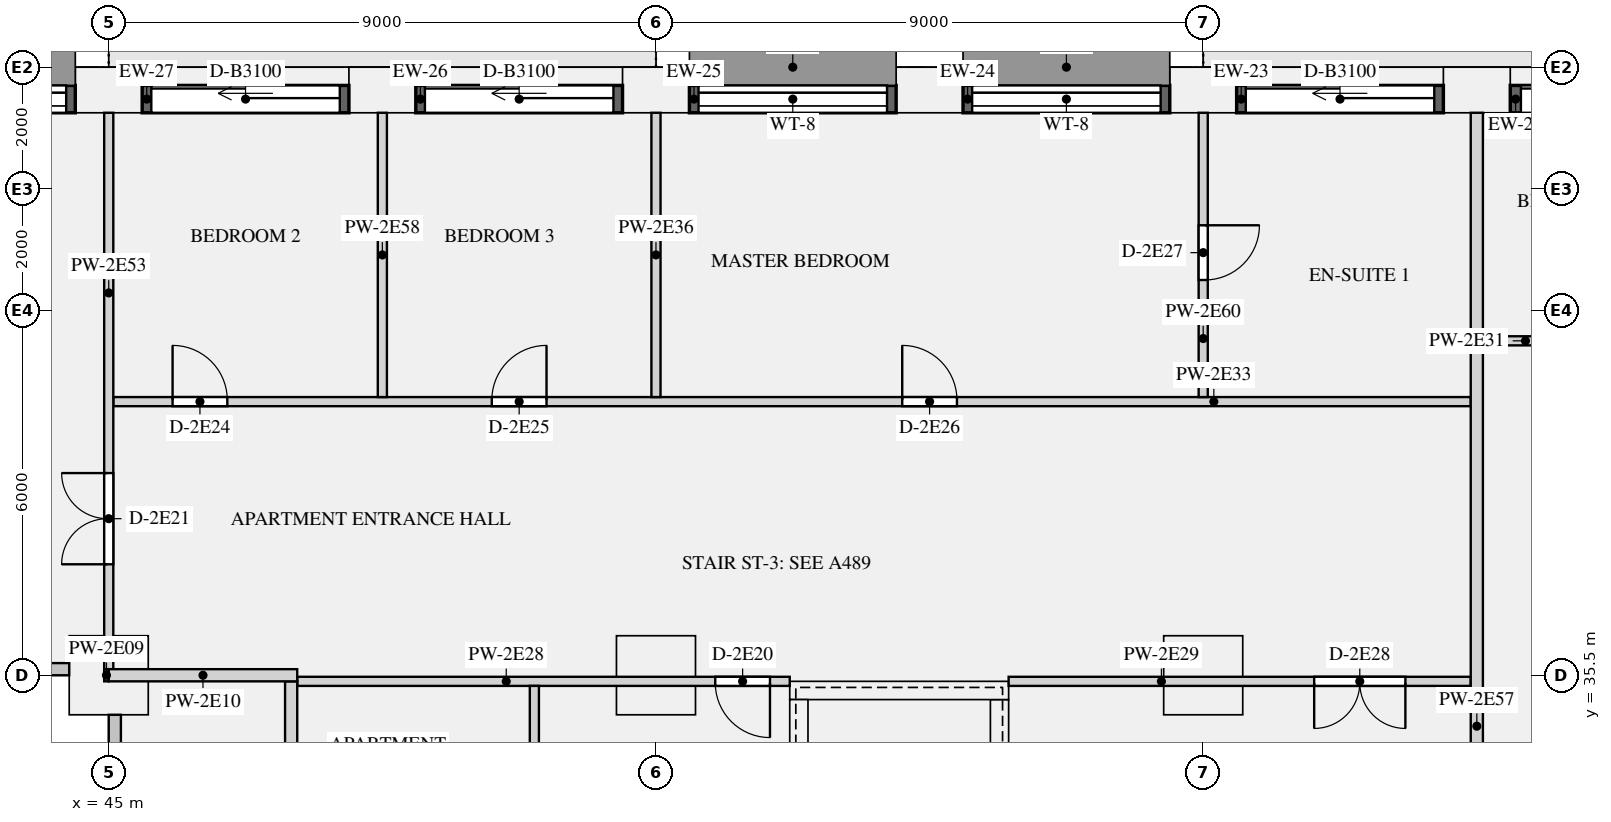
"""IFC4 building model, lengths in metres.
Left out: names, types, materials, properties, quantities, classifications, styles, units other than length and angle.
Written with IfcOpenShell. Run it as: python <this file> out.ifc"""

import sys

from ifc_helpers import new_model, si_unit, direction, frame, frame_2d, origin, origin_2d, place, context, subcontext, project, spatial, rectangle, extrude, element, fill, save


model = new_model("IFC4")
c1 = context("Model", 3, precision=1e-05, world=origin(), true_north=direction((0.0, 1.0)))
c2 = subcontext(c1, "Body", "Model", "MODEL_VIEW")
j1 = project(units=[si_unit("LENGTHUNIT", "METRE"), si_unit("PLANEANGLEUNIT", "RADIAN")], contexts=[c1])
p1 = place(None, origin())
s1 = spatial("IfcSite", under=j1, at=p1, CompositionType="ELEMENT")
p2 = place(p1, origin())
s2 = spatial("IfcBuilding", under=s1, at=p2, CompositionType="ELEMENT")
p3 = place(p2, frame((0.0, 0.0, 118.2)))
s3 = spatial("IfcBuildingStorey", under=s2, at=p3, CompositionType="ELEMENT", Elevation=118.2)
for number, where, z_axis, x_axis in (
    (1, (67.5, 45.125, 0.0), (0.0, 0.0, 1.0), (-1.0, 0.0, 0.0)),
    (2, (63.0, 45.125, 0.0), (0.0, 0.0, 1.0), (-1.0, 0.0, 0.0)),
    (3, (58.5, 45.125, 0.0), (0.0, 0.0, 1.0), (-1.0, 0.0, 0.0)),
    (4, (54.0, 45.125, 0.0), (0.0, 0.0, 1.0), (-1.0, 0.0, 0.0)),
    (5, (49.5, 45.125, 0.0), (0.0, 0.0, 1.0), (-1.0, 0.0, 0.0)),
    (6, (45.0, 45.125, 0.0), (0.0, 0.0, 1.0), (-1.0, 0.0, 0.0)),
):
    element("IfcColumn", number, at=place(p3, frame(where, z_axis=z_axis, x_axis=x_axis)), inside=s3, PredefinedType="USERDEFINED", context=c2, shape_type="SweptSolid", body=[
        extrude(rectangle(XDim=1.1, YDim=0.75, at=origin_2d()), origin(), (0.0, 0.0, 1.0), 3.15),
    ])
for number, where, z_axis, x_axis in (
    (7, (45.0, 35.5, 0.0), (0.0, 0.0, 1.0), (1.0, 0.0, 0.0)),
    (8, (54.0, 35.5, 0.0), (0.0, 0.0, 1.0), (1.0, 0.0, 0.0)),
    (9, (63.0, 35.5, 0.0), (0.0, 0.0, 1.0), (1.0, 0.0, 0.0)),
):
    element("IfcColumn", number, at=place(p3, frame(where, z_axis=z_axis, x_axis=x_axis)), inside=s3, PredefinedType="COLUMN", context=c2, shape_type="SweptSolid", body=[
        extrude(rectangle(XDim=1.3, YDim=1.3, at=origin_2d()), origin(), (0.0, 0.0, 1.0), 3.15),
    ])
p4 = place(p3, frame((56.2, 35.25, 0.0), z_axis=(0.0, 0.0, 1.0), x_axis=(1.0, 0.0, 0.0)))
e10 = element("IfcWall", 10, at=p4, inside=s3, PredefinedType="SHEAR", context=c2, shape_type="SweptSolid", body=[
    extrude(rectangle(XDim=3.6, YDim=0.3, at=frame_2d((1.8, 0.0))), origin(), (0.0, 0.0, 1.0), 3.15),
])
for number, where, z_axis, x_axis in (
    (11, (56.35, 27.3, 0.0), (0.0, 0.0, 1.0), (0.0, 1.0, 0.0)),
    (12, (59.65, 27.3, 0.0), (0.0, 0.0, 1.0), (0.0, 1.0, 0.0)),
):
    element("IfcWall", number, at=place(p3, frame(where, z_axis=z_axis, x_axis=x_axis)), inside=s3, PredefinedType="SHEAR", context=c2, shape_type="SweptSolid", body=[
        extrude(rectangle(XDim=7.8, YDim=0.3, at=frame_2d((3.9, 0.0))), origin(), (0.0, 0.0, 1.0), 3.15),
    ])
p5 = place(p3, frame((70.9, 44.975, 0.0), z_axis=(0.0, 0.0, 1.0), x_axis=(-1.0, 0.0, 0.0)))
e13 = element("IfcWall", 13, at=p5, inside=s3, PredefinedType="SOLIDWALL", context=c2, shape_type="SweptSolid", body=[
    extrude(rectangle(XDim=2.85, YDim=0.45, at=frame_2d((1.425, 0.0))), origin(), (0.0, 0.0, 1.0), 2.83),
])
p6 = place(p5, frame((0.175, 0.0, 0.0)))
e14 = element("IfcOpeningElement", 14, at=p6, cuts=e13, PredefinedType="OPENING", context=c2, shape_type="SweptSolid", body=[
    extrude(rectangle(XDim=2.5, YDim=2.3, at=frame_2d((1.25, 1.15))), frame((0.0, 0.235, 0.0), z_axis=(0.0, -1.0, 0.0), x_axis=(1.0, 0.0, 0.0)), (0.0, 0.0, 1.0), 0.47),
])
p7 = place(p3, frame((66.95, 44.975, 0.0), z_axis=(0.0, 0.0, 1.0), x_axis=(-1.0, 0.0, 0.0)))
e15 = element("IfcWall", 15, at=p7, inside=s3, PredefinedType="SOLIDWALL", context=c2, shape_type="SweptSolid", body=[
    extrude(rectangle(XDim=3.4, YDim=0.45, at=frame_2d((1.7, 0.0))), origin(), (0.0, 0.0, 1.0), 2.83),
])
p8 = place(p7, frame((0.15, 0.0, 0.0)))
e16 = element("IfcOpeningElement", 16, at=p8, cuts=e15, PredefinedType="OPENING", context=c2, shape_type="SweptSolid", body=[
    extrude(rectangle(XDim=3.1, YDim=2.3, at=frame_2d((1.55, 1.15))), frame((0.0, 0.235, 0.0), z_axis=(0.0, -1.0, 0.0), x_axis=(1.0, 0.0, 0.0)), (0.0, 0.0, 1.0), 0.47),
])
p9 = place(p3, frame((62.45, 44.975, 0.9), z_axis=(0.0, 0.0, 1.0), x_axis=(-1.0, 0.0, 0.0)))
e17 = element("IfcWall", 17, at=p9, inside=s3, PredefinedType="SOLIDWALL", context=c2, shape_type="SweptSolid", body=[
    extrude(rectangle(XDim=3.4, YDim=0.45, at=frame_2d((1.7, 0.0))), origin(), (0.0, 0.0, 1.0), 1.93),
])
p10 = place(p9, frame((0.15, 0.0, 0.15)))
e18 = element("IfcOpeningElement", 18, at=p10, cuts=e17, PredefinedType="OPENING", context=c2, shape_type="SweptSolid", body=[
    extrude(rectangle(XDim=3.1, YDim=1.5, at=frame_2d((1.55, 0.75))), frame((0.0, 0.235, 0.0), z_axis=(0.0, -1.0, 0.0), x_axis=(1.0, 0.0, 0.0)), (0.0, 0.0, 1.0), 0.47),
])
p11 = place(p3, frame((57.95, 44.975, 0.9), z_axis=(0.0, 0.0, 1.0), x_axis=(-1.0, 0.0, 0.0)))
e19 = element("IfcWall", 19, at=p11, inside=s3, PredefinedType="SOLIDWALL", context=c2, shape_type="SweptSolid", body=[
    extrude(rectangle(XDim=3.4, YDim=0.45, at=frame_2d((1.7, 0.0))), origin(), (0.0, 0.0, 1.0), 1.93),
])
p12 = place(p11, frame((0.15, 0.0, 0.15)))
e20 = element("IfcOpeningElement", 20, at=p12, cuts=e19, PredefinedType="OPENING", context=c2, shape_type="SweptSolid", body=[
    extrude(rectangle(XDim=3.1, YDim=1.5, at=frame_2d((1.55, 0.75))), frame((0.0, 0.235, 0.0), z_axis=(0.0, -1.0, 0.0), x_axis=(1.0, 0.0, 0.0)), (0.0, 0.0, 1.0), 0.47),
])
p13 = place(p3, frame((53.45, 44.975, 0.0), z_axis=(0.0, 0.0, 1.0), x_axis=(-1.0, 0.0, 0.0)))
e21 = element("IfcWall", 21, at=p13, inside=s3, PredefinedType="SOLIDWALL", context=c2, shape_type="SweptSolid", body=[
    extrude(rectangle(XDim=3.4, YDim=0.45, at=frame_2d((1.7, 0.0))), origin(), (0.0, 0.0, 1.0), 2.83),
])
p14 = place(p13, frame((0.15, 0.0, 0.0)))
e22 = element("IfcOpeningElement", 22, at=p14, cuts=e21, PredefinedType="OPENING", context=c2, shape_type="SweptSolid", body=[
    extrude(rectangle(XDim=3.1, YDim=2.3, at=frame_2d((1.55, 1.15))), frame((0.0, 0.235, 0.0), z_axis=(0.0, -1.0, 0.0), x_axis=(1.0, 0.0, 0.0)), (0.0, 0.0, 1.0), 0.47),
])
p15 = place(p3, frame((48.95, 44.975, 0.0), z_axis=(0.0, 0.0, 1.0), x_axis=(-1.0, 0.0, 0.0)))
e23 = element("IfcWall", 23, at=p15, inside=s3, PredefinedType="SOLIDWALL", context=c2, shape_type="SweptSolid", body=[
    extrude(rectangle(XDim=3.4, YDim=0.45, at=frame_2d((1.7, 0.0))), origin(), (0.0, 0.0, 1.0), 2.83),
])
p16 = place(p15, frame((0.15, 0.0, 0.0)))
e24 = element("IfcOpeningElement", 24, at=p16, cuts=e23, PredefinedType="OPENING", context=c2, shape_type="SweptSolid", body=[
    extrude(rectangle(XDim=3.1, YDim=2.3, at=frame_2d((1.55, 1.15))), frame((0.0, 0.235, 0.0), z_axis=(0.0, -1.0, 0.0), x_axis=(1.0, 0.0, 0.0)), (0.0, 0.0, 1.0), 0.47),
])
p17 = place(p3, frame((44.45, 44.975, 0.9), z_axis=(0.0, 0.0, 1.0), x_axis=(-1.0, 0.0, 0.0)))
e25 = element("IfcWall", 25, at=p17, inside=s3, PredefinedType="SOLIDWALL", context=c2, shape_type="SweptSolid", body=[
    extrude(rectangle(XDim=3.4, YDim=0.45, at=frame_2d((1.7, 0.0))), origin(), (0.0, 0.0, 1.0), 1.93),
])
p18 = place(p17, frame((0.15, 0.0, 0.15)))
e26 = element("IfcOpeningElement", 26, at=p18, cuts=e25, PredefinedType="OPENING", context=c2, shape_type="SweptSolid", body=[
    extrude(rectangle(XDim=3.1, YDim=1.5, at=frame_2d((1.55, 0.75))), frame((0.0, 0.235, 0.0), z_axis=(0.0, -1.0, 0.0), x_axis=(1.0, 0.0, 0.0)), (0.0, 0.0, 1.0), 0.47),
])
p19 = place(p3, frame((44.925, 35.5, 0.0), z_axis=(0.0, 0.0, 1.0), x_axis=(1.0, 0.0, 0.0)))
e27 = element("IfcWall", 27, at=p19, inside=s3, PredefinedType="PARTITIONING", context=c2, shape_type="SweptSolid", body=[
    extrude(rectangle(XDim=0.075, YDim=0.2, at=frame_2d((0.038, 0.0))), origin(), (0.0, 0.0, 1.0), 2.83),
])
p20 = place(p3, frame((45.0, 35.5, 0.0), z_axis=(0.0, 0.0, 1.0), x_axis=(1.0, 0.0, 0.0)))
e28 = element("IfcWall", 28, at=p20, inside=s3, PredefinedType="PARTITIONING", context=c2, shape_type="SweptSolid", body=[
    extrude(rectangle(XDim=3.1, YDim=0.2, at=frame_2d((1.55, 0.0))), origin(), (0.0, 0.0, 1.0), 2.83),
])
p21 = place(p3, frame((48.1, 35.4, 0.0), z_axis=(0.0, 0.0, 1.0), x_axis=(1.0, 0.0, 0.0)))
e29 = element("IfcWall", 29, at=p21, inside=s3, PredefinedType="PARTITIONING", context=c2, shape_type="SweptSolid", body=[
    extrude(rectangle(XDim=8.1, YDim=0.15, at=frame_2d((4.05, 0.0))), origin(), (0.0, 0.0, 1.0), 2.83),
])
p22 = place(p21, frame((6.875, 0.0, 0.0)))
e30 = element("IfcOpeningElement", 30, at=p22, cuts=e29, PredefinedType="OPENING", context=c2, shape_type="SweptSolid", body=[
    extrude(rectangle(XDim=0.9, YDim=2.1, at=frame_2d((0.45, 1.05))), frame((0.0, 0.085, 0.0), z_axis=(0.0, -1.0, 0.0), x_axis=(1.0, 0.0, 0.0)), (0.0, 0.0, 1.0), 0.17),
])
p23 = place(p3, frame((59.8, 35.4, 0.0), z_axis=(0.0, 0.0, 1.0), x_axis=(1.0, 0.0, 0.0)))
e31 = element("IfcWall", 31, at=p23, inside=s3, PredefinedType="PARTITIONING", context=c2, shape_type="SweptSolid", body=[
    extrude(rectangle(XDim=7.6, YDim=0.15, at=frame_2d((3.8, 0.0))), origin(), (0.0, 0.0, 1.0), 2.83),
])
p24 = place(p23, frame((5.025, 0.0, 0.0)))
e32 = element("IfcOpeningElement", 32, at=p24, cuts=e31, PredefinedType="OPENING", context=c2, shape_type="SweptSolid", body=[
    extrude(rectangle(XDim=1.5, YDim=2.1, at=frame_2d((0.75, 1.05))), frame((0.0, 0.085, 0.0), z_axis=(0.0, -1.0, 0.0), x_axis=(1.0, 0.0, 0.0)), (0.0, 0.0, 1.0), 0.17),
])
p25 = place(p3, frame((67.6, 41.0, 0.0), z_axis=(0.0, 0.0, 1.0), x_axis=(1.0, 0.0, 0.0)))
e33 = element("IfcWall", 33, at=p25, inside=s3, PredefinedType="PARTITIONING", context=c2, shape_type="SweptSolid", body=[
    extrude(rectangle(XDim=3.65, YDim=0.15, at=frame_2d((1.825, 0.0))), origin(), (0.0, 0.0, 1.0), 2.83),
])
p26 = place(p25, frame((1.4, 0.0, 0.0)))
e34 = element("IfcOpeningElement", 34, at=p26, cuts=e33, PredefinedType="OPENING", context=c2, shape_type="SweptSolid", body=[
    extrude(rectangle(XDim=0.9, YDim=2.1, at=frame_2d((0.45, 1.05))), frame((0.0, 0.085, 0.0), z_axis=(0.0, -1.0, 0.0), x_axis=(1.0, 0.0, 0.0)), (0.0, 0.0, 1.0), 0.17),
])
p27 = place(p3, frame((45.075, 40.0, 0.0), z_axis=(0.0, 0.0, 1.0), x_axis=(1.0, 0.0, 0.0)))
e35 = element("IfcWall", 35, at=p27, inside=s3, PredefinedType="PARTITIONING", context=c2, shape_type="SweptSolid", body=[
    extrude(rectangle(XDim=22.325, YDim=0.15, at=frame_2d((11.163, 0.0))), origin(), (0.0, 0.0, 1.0), 2.83),
])
p28 = place(p27, frame((0.975, 0.0, 0.0)))
e36 = element("IfcOpeningElement", 36, at=p28, cuts=e35, PredefinedType="OPENING", context=c2, shape_type="SweptSolid", body=[
    extrude(rectangle(XDim=0.9, YDim=2.1, at=frame_2d((0.45, 1.05))), frame((0.0, 0.085, 0.0), z_axis=(0.0, -1.0, 0.0), x_axis=(1.0, 0.0, 0.0)), (0.0, 0.0, 1.0), 0.17),
])
p29 = place(p27, frame((6.225, 0.0, 0.0)))
e37 = element("IfcOpeningElement", 37, at=p29, cuts=e35, PredefinedType="OPENING", context=c2, shape_type="SweptSolid", body=[
    extrude(rectangle(XDim=0.9, YDim=2.1, at=frame_2d((0.45, 1.05))), frame((0.0, 0.085, 0.0), z_axis=(0.0, -1.0, 0.0), x_axis=(1.0, 0.0, 0.0)), (0.0, 0.0, 1.0), 0.17),
])
p30 = place(p27, frame((12.975, 0.0, 0.0)))
e38 = element("IfcOpeningElement", 38, at=p30, cuts=e35, PredefinedType="OPENING", context=c2, shape_type="SweptSolid", body=[
    extrude(rectangle(XDim=0.9, YDim=2.1, at=frame_2d((0.45, 1.05))), frame((0.0, 0.085, 0.0), z_axis=(0.0, -1.0, 0.0), x_axis=(1.0, 0.0, 0.0)), (0.0, 0.0, 1.0), 0.17),
])
p31 = place(p3, frame((54.0, 40.075, 0.0), z_axis=(0.0, 0.0, 1.0), x_axis=(0.0, 1.0, 0.0)))
e39 = element("IfcWall", 39, at=p31, inside=s3, PredefinedType="PARTITIONING", context=c2, shape_type="SweptSolid", body=[
    extrude(rectangle(XDim=4.675, YDim=0.15, at=frame_2d((2.337, 0.0))), origin(), (0.0, 0.0, 1.0), 2.83),
])
p32 = place(p3, frame((48.0, 27.1, 0.0), z_axis=(0.0, 0.0, 1.0), x_axis=(0.0, 1.0, 0.0)))
e40 = element("IfcWall", 40, at=p32, inside=s3, PredefinedType="PARTITIONING", context=c2, shape_type="SweptSolid", body=[
    extrude(rectangle(XDim=8.3, YDim=0.2, at=frame_2d((4.15, 0.0))), origin(), (0.0, 0.0, 1.0), 2.83),
])
p33 = place(p3, frame((52.0, 27.1, 0.0), z_axis=(0.0, 0.0, 1.0), x_axis=(0.0, 1.0, 0.0)))
e41 = element("IfcWall", 41, at=p33, inside=s3, PredefinedType="PARTITIONING", context=c2, shape_type="SweptSolid", body=[
    extrude(rectangle(XDim=8.225, YDim=0.15, at=frame_2d((4.112, 0.0))), origin(), (0.0, 0.0, 1.0), 2.83),
])
p34 = place(p33, frame((1.45, 0.0, 0.0)))
e42 = element("IfcOpeningElement", 42, at=p34, cuts=e41, PredefinedType="OPENING", context=c2, shape_type="SweptSolid", body=[
    extrude(rectangle(XDim=0.9, YDim=2.1, at=frame_2d((0.45, 1.05))), frame((0.0, 0.085, 0.0), z_axis=(0.0, -1.0, 0.0), x_axis=(1.0, 0.0, 0.0)), (0.0, 0.0, 1.0), 0.17),
])
p35 = place(p33, frame((5.65, 0.0, 0.0)))
e43 = element("IfcOpeningElement", 43, at=p35, cuts=e41, PredefinedType="OPENING", context=c2, shape_type="SweptSolid", body=[
    extrude(rectangle(XDim=0.9, YDim=2.1, at=frame_2d((0.45, 1.05))), frame((0.0, 0.085, 0.0), z_axis=(0.0, -1.0, 0.0), x_axis=(1.0, 0.0, 0.0)), (0.0, 0.0, 1.0), 0.17),
])
p36 = place(p3, frame((45.0, 35.6, 0.0), z_axis=(0.0, 0.0, 1.0), x_axis=(0.0, 1.0, 0.0)))
e44 = element("IfcWall", 44, at=p36, inside=s3, PredefinedType="PARTITIONING", context=c2, shape_type="SweptSolid", body=[
    extrude(rectangle(XDim=9.15, YDim=0.15, at=frame_2d((4.575, 0.0))), origin(), (0.0, 0.0, 1.0), 2.83),
])
p37 = place(p36, frame((1.725, 0.0, 0.0)))
e45 = element("IfcOpeningElement", 45, at=p37, cuts=e44, PredefinedType="OPENING", context=c2, shape_type="SweptSolid", body=[
    extrude(rectangle(XDim=1.5, YDim=2.1, at=frame_2d((0.75, 1.05))), frame((0.0, 0.085, 0.0), z_axis=(0.0, -1.0, 0.0), x_axis=(1.0, 0.0, 0.0)), (0.0, 0.0, 1.0), 0.17),
])
p38 = place(p3, frame((67.5, 24.575, 0.0), z_axis=(0.0, 0.0, 1.0), x_axis=(0.0, 1.0, 0.0)))
e46 = element("IfcWall", 46, at=p38, inside=s3, PredefinedType="PARTITIONING", context=c2, shape_type="SweptSolid", body=[
    extrude(rectangle(XDim=20.175, YDim=0.2, at=frame_2d((10.087, 0.0))), origin(), (0.0, 0.0, 1.0), 2.83),
])
p39 = place(p3, frame((49.5, 40.075, 0.0), z_axis=(0.0, 0.0, 1.0), x_axis=(0.0, 1.0, 0.0)))
e47 = element("IfcWall", 47, at=p39, inside=s3, PredefinedType="PARTITIONING", context=c2, shape_type="SweptSolid", body=[
    extrude(rectangle(XDim=4.675, YDim=0.15, at=frame_2d((2.337, 0.0))), origin(), (0.0, 0.0, 1.0), 2.83),
])
p40 = place(p3, frame((63.0, 40.075, 0.0), z_axis=(0.0, 0.0, 1.0), x_axis=(0.0, 1.0, 0.0)))
e48 = element("IfcWall", 48, at=p40, inside=s3, PredefinedType="PARTITIONING", context=c2, shape_type="SweptSolid", body=[
    extrude(rectangle(XDim=4.675, YDim=0.15, at=frame_2d((2.337, 0.0))), origin(), (0.0, 0.0, 1.0), 2.83),
])
p41 = place(p40, frame((1.925, 0.0, 0.0)))
e49 = element("IfcOpeningElement", 49, at=p41, cuts=e48, PredefinedType="OPENING", context=c2, shape_type="SweptSolid", body=[
    extrude(rectangle(XDim=0.9, YDim=2.1, at=frame_2d((0.45, 1.05))), frame((0.0, 0.085, 0.0), z_axis=(0.0, -1.0, 0.0), x_axis=(1.0, 0.0, 0.0)), (0.0, 0.0, 1.0), 0.17),
])
p42 = place(p6, origin())
e50 = element("IfcDoor", 50, at=p42, inside=s3, OperationType="SLIDING_TO_LEFT", PredefinedType="DOOR", context=c2, shape_type="SweptSolid", body=[
    extrude(rectangle(XDim=2.5, YDim=2.3, at=frame_2d((1.25, 1.15))), frame((0.0, -0.07, 0.0), z_axis=(0.0, -1.0, 0.0), x_axis=(1.0, 0.0, 0.0)), (0.0, 0.0, 1.0), 0.05),
])
fill(e14, e50)
p43 = place(p8, origin())
e51 = element("IfcDoor", 51, at=p43, inside=s3, OperationType="SLIDING_TO_LEFT", PredefinedType="DOOR", context=c2, shape_type="SweptSolid", body=[
    extrude(rectangle(XDim=3.1, YDim=2.3, at=frame_2d((1.55, 1.15))), frame((0.0, -0.07, 0.0), z_axis=(0.0, -1.0, 0.0), x_axis=(1.0, 0.0, 0.0)), (0.0, 0.0, 1.0), 0.05),
])
fill(e16, e51)
p44 = place(p10, origin())
e52 = element("IfcWindow", 52, at=p44, inside=s3, PartitioningType="SINGLE_PANEL", PredefinedType="WINDOW", context=c2, shape_type="SweptSolid", body=[
    extrude(rectangle(XDim=3.1, YDim=1.5, at=frame_2d((1.55, 0.75))), frame((0.0, -0.065, 0.0), z_axis=(0.0, -1.0, 0.0), x_axis=(1.0, 0.0, 0.0)), (0.0, 0.0, 1.0), 0.06),
])
fill(e18, e52)
p45 = place(p12, origin())
e53 = element("IfcWindow", 53, at=p45, inside=s3, PartitioningType="SINGLE_PANEL", PredefinedType="WINDOW", context=c2, shape_type="SweptSolid", body=[
    extrude(rectangle(XDim=3.1, YDim=1.5, at=frame_2d((1.55, 0.75))), frame((0.0, -0.065, 0.0), z_axis=(0.0, -1.0, 0.0), x_axis=(1.0, 0.0, 0.0)), (0.0, 0.0, 1.0), 0.06),
])
fill(e20, e53)
p46 = place(p14, origin())
e54 = element("IfcDoor", 54, at=p46, inside=s3, OperationType="SLIDING_TO_LEFT", PredefinedType="DOOR", context=c2, shape_type="SweptSolid", body=[
    extrude(rectangle(XDim=3.1, YDim=2.3, at=frame_2d((1.55, 1.15))), frame((0.0, -0.07, 0.0), z_axis=(0.0, -1.0, 0.0), x_axis=(1.0, 0.0, 0.0)), (0.0, 0.0, 1.0), 0.05),
])
fill(e22, e54)
p47 = place(p16, origin())
e55 = element("IfcDoor", 55, at=p47, inside=s3, OperationType="SLIDING_TO_LEFT", PredefinedType="DOOR", context=c2, shape_type="SweptSolid", body=[
    extrude(rectangle(XDim=3.1, YDim=2.3, at=frame_2d((1.55, 1.15))), frame((0.0, -0.07, 0.0), z_axis=(0.0, -1.0, 0.0), x_axis=(1.0, 0.0, 0.0)), (0.0, 0.0, 1.0), 0.05),
])
fill(e24, e55)
p48 = place(p18, origin())
e56 = element("IfcWindow", 56, at=p48, inside=s3, PartitioningType="SINGLE_PANEL", PredefinedType="WINDOW", context=c2, shape_type="SweptSolid", body=[
    extrude(rectangle(XDim=3.1, YDim=1.5, at=frame_2d((1.55, 0.75))), frame((0.0, -0.065, 0.0), z_axis=(0.0, -1.0, 0.0), x_axis=(1.0, 0.0, 0.0)), (0.0, 0.0, 1.0), 0.06),
])
fill(e26, e56)
p49 = place(p22, frame((0.9, 0.0, 0.0), z_axis=(0.0, 0.0, 1.0), x_axis=(-1.0, 0.0, 0.0)))
e57 = element("IfcDoor", 57, at=p49, inside=s3, OperationType="SINGLE_SWING_LEFT", PredefinedType="DOOR", context=c2, shape_type="SweptSolid", body=[
    extrude(rectangle(XDim=0.9, YDim=2.1, at=frame_2d((0.45, 1.05))), frame((0.0, 0.025, 0.0), z_axis=(0.0, -1.0, 0.0), x_axis=(1.0, 0.0, 0.0)), (0.0, 0.0, 1.0), 0.05),
])
fill(e30, e57)
p50 = place(p37, origin())
e58 = element("IfcDoor", 58, at=p50, inside=s3, OperationType="DOUBLE_DOOR_SINGLE_SWING", PredefinedType="DOOR", context=c2, shape_type="SweptSolid", body=[
    extrude(rectangle(XDim=1.5, YDim=2.1, at=frame_2d((0.75, 1.05))), frame((0.0, 0.025, 0.0), z_axis=(0.0, -1.0, 0.0), x_axis=(1.0, 0.0, 0.0)), (0.0, 0.0, 1.0), 0.05),
])
fill(e45, e58)
p51 = place(p28, origin())
e59 = element("IfcDoor", 59, at=p51, inside=s3, OperationType="SINGLE_SWING_LEFT", PredefinedType="DOOR", context=c2, shape_type="SweptSolid", body=[
    extrude(rectangle(XDim=0.9, YDim=2.1, at=frame_2d((0.45, 1.05))), frame((0.0, 0.025, 0.0), z_axis=(0.0, -1.0, 0.0), x_axis=(1.0, 0.0, 0.0)), (0.0, 0.0, 1.0), 0.05),
])
fill(e36, e59)
p52 = place(p29, origin())
e60 = element("IfcDoor", 60, at=p52, inside=s3, OperationType="SINGLE_SWING_RIGHT", PredefinedType="DOOR", context=c2, shape_type="SweptSolid", body=[
    extrude(rectangle(XDim=0.9, YDim=2.1, at=frame_2d((0.45, 1.05))), frame((0.0, 0.025, 0.0), z_axis=(0.0, -1.0, 0.0), x_axis=(1.0, 0.0, 0.0)), (0.0, 0.0, 1.0), 0.05),
])
fill(e37, e60)
p53 = place(p30, origin())
e61 = element("IfcDoor", 61, at=p53, inside=s3, OperationType="SINGLE_SWING_LEFT", PredefinedType="DOOR", context=c2, shape_type="SweptSolid", body=[
    extrude(rectangle(XDim=0.9, YDim=2.1, at=frame_2d((0.45, 1.05))), frame((0.0, 0.025, 0.0), z_axis=(0.0, -1.0, 0.0), x_axis=(1.0, 0.0, 0.0)), (0.0, 0.0, 1.0), 0.05),
])
fill(e38, e61)
p54 = place(p41, frame((0.9, 0.0, 0.0), z_axis=(0.0, 0.0, 1.0), x_axis=(-1.0, 0.0, 0.0)))
e62 = element("IfcDoor", 62, at=p54, inside=s3, OperationType="SINGLE_SWING_LEFT", PredefinedType="DOOR", context=c2, shape_type="SweptSolid", body=[
    extrude(rectangle(XDim=0.9, YDim=2.1, at=frame_2d((0.45, 1.05))), frame((0.0, 0.025, 0.0), z_axis=(0.0, -1.0, 0.0), x_axis=(1.0, 0.0, 0.0)), (0.0, 0.0, 1.0), 0.05),
])
fill(e49, e62)
p55 = place(p24, frame((1.5, 0.0, 0.0), z_axis=(0.0, 0.0, 1.0), x_axis=(-1.0, 0.0, 0.0)))
e63 = element("IfcDoor", 63, at=p55, inside=s3, OperationType="DOUBLE_DOOR_SINGLE_SWING", PredefinedType="DOOR", context=c2, shape_type="SweptSolid", body=[
    extrude(rectangle(XDim=1.5, YDim=2.1, at=frame_2d((0.75, 1.05))), frame((0.0, 0.025, 0.0), z_axis=(0.0, -1.0, 0.0), x_axis=(1.0, 0.0, 0.0)), (0.0, 0.0, 1.0), 0.05),
])
fill(e32, e63)
save(model, sys.argv[1])
